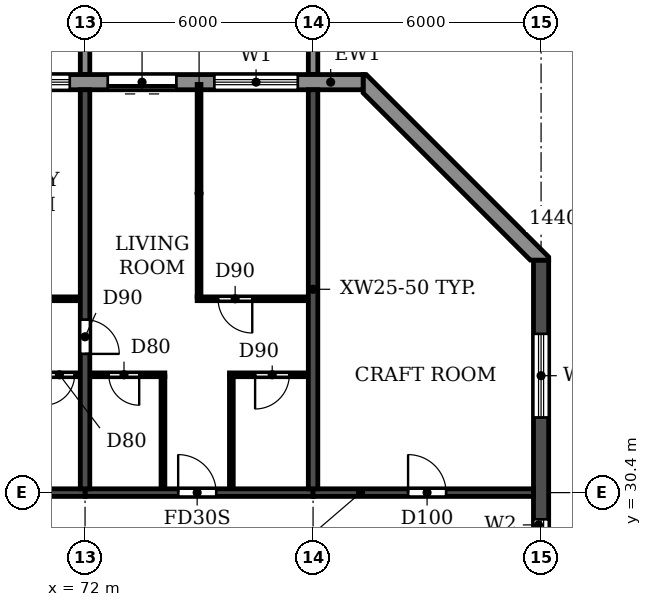
"""IFC4 building model, lengths in metres.
Left out: names, types, materials, properties, quantities, classifications, styles, units other than length and angle.
Written with IfcOpenShell. Run it as: python <this file> out.ifc"""

import sys

from ifc_helpers import new_model, si_unit, direction, frame, frame_2d, origin, place, context, subcontext, project, spatial, polyline, rectangle, outline, extrude, source, transform, mapped, element, fill, save


model = new_model("IFC4")
c1 = context("Model", 3, precision=1e-05, world=origin(), true_north=direction((0.0, 1.0)))
c2 = subcontext(c1, "Body", "Model", "MODEL_VIEW")
j1 = project(units=[si_unit("LENGTHUNIT", "METRE"), si_unit("PLANEANGLEUNIT", "RADIAN")], contexts=[c1])
p1 = place(None, origin())
s1 = spatial("IfcSite", under=j1, at=p1, CompositionType="ELEMENT")
p2 = place(p1, origin())
s2 = spatial("IfcBuilding", under=s1, at=p2, CompositionType="ELEMENT")
p3 = place(p2, frame((0.0, 0.0, 201.6)))
s3 = spatial("IfcBuildingStorey", under=s2, at=p3, CompositionType="ELEMENT", Elevation=201.6)
p4 = place(p3, frame((72.0, 30.5, 0.0), z_axis=(0.0, 0.0, 1.0), x_axis=(0.0, 1.0, 0.0)))
e1 = element("IfcWall", 1, at=p4, inside=s3, PredefinedType="SHEAR", context=c2, shape_type="SweptSolid", body=[
    extrude(rectangle(XDim=10.5, YDim=0.25, at=frame_2d((5.25, 0.0))), origin(), (0.0, 0.0, 1.0), 3.08),
])
p5 = place(p4, frame((3.55, 0.0, 0.0)))
e2 = element("IfcOpeningElement", 2, at=p5, cuts=e1, PredefinedType="OPENING", context=c2, shape_type="SweptSolid", body=[
    extrude(rectangle(XDim=0.9, YDim=2.1, at=frame_2d((0.45, 1.05))), frame((0.0, 0.135, 0.0), z_axis=(0.0, -1.0, 0.0), x_axis=(1.0, 0.0, 0.0)), (0.0, 0.0, 1.0), 0.27),
])
p6 = place(p3, frame((78.0, 30.5, 0.0), z_axis=(0.0, 0.0, 1.0), x_axis=(0.0, 1.0, 0.0)))
e3 = element("IfcWall", 3, at=p6, inside=s3, PredefinedType="SHEAR", context=c2, shape_type="SweptSolid", body=[
    extrude(rectangle(XDim=10.5, YDim=0.25, at=frame_2d((5.25, 0.0))), origin(), (0.0, 0.0, 1.0), 3.08),
])
p7 = place(p3, frame((84.0, 4.683, 0.0), z_axis=(0.0, 0.0, 1.0), x_axis=(0.0, 1.0, 0.0)))
e4 = element("IfcWall", 4, at=p7, inside=s3, PredefinedType="SHEAR", context=c2, shape_type="SweptSolid", body=[
    extrude(rectangle(XDim=31.834, YDim=0.4, at=frame_2d((15.917, 0.0))), origin(), (0.0, 0.0, 1.0), 3.08),
])
p8 = place(p7, frame((23.817, 0.0, 0.9)))
e5 = element("IfcOpeningElement", 5, at=p8, cuts=e4, PredefinedType="OPENING", context=c2, shape_type="SweptSolid", body=[
    extrude(rectangle(XDim=1.2, YDim=1.5, at=frame_2d((0.6, 0.75))), frame((0.0, 0.21, 0.0), z_axis=(0.0, -1.0, 0.0), x_axis=(1.0, 0.0, 0.0)), (0.0, 0.0, 1.0), 0.42),
])
p9 = place(p7, frame((8.017, 0.0, 0.9)))
e6 = element("IfcOpeningElement", 6, at=p9, cuts=e4, PredefinedType="OPENING", context=c2, shape_type="SweptSolid", body=[
    extrude(rectangle(XDim=1.2, YDim=1.5, at=frame_2d((0.6, 0.75))), frame((0.0, 0.21, 0.0), z_axis=(0.0, -1.0, 0.0), x_axis=(1.0, 0.0, 0.0)), (0.0, 0.0, 1.0), 0.42),
])
p10 = place(p7, frame((27.694, 0.0, 0.6)))
e7 = element("IfcOpeningElement", 7, at=p10, cuts=e4, PredefinedType="OPENING", context=c2, shape_type="SweptSolid", body=[
    extrude(rectangle(XDim=2.2, YDim=1.8, at=frame_2d((1.1, 0.9))), frame((0.0, 0.21, 0.0), z_axis=(0.0, -1.0, 0.0), x_axis=(1.0, 0.0, 0.0)), (0.0, 0.0, 1.0), 0.42),
])
p11 = place(p7, frame((2.541, 0.0, 0.6)))
e8 = element("IfcOpeningElement", 8, at=p11, cuts=e4, PredefinedType="OPENING", context=c2, shape_type="SweptSolid", body=[
    extrude(rectangle(XDim=2.2, YDim=1.8, at=frame_2d((1.1, 0.9))), frame((0.0, 0.21, 0.0), z_axis=(0.0, -1.0, 0.0), x_axis=(1.0, 0.0, 0.0)), (0.0, 0.0, 1.0), 0.42),
])
p12 = place(p7, frame((15.917, 0.0, 0.9)))
e9 = element("IfcOpeningElement", 9, at=p12, cuts=e4, PredefinedType="OPENING", context=c2, shape_type="SweptSolid", body=[
    extrude(rectangle(XDim=1.2, YDim=1.5, at=frame_2d((0.6, 0.75))), frame((0.0, 0.21, 0.0), z_axis=(0.0, -1.0, 0.0), x_axis=(1.0, 0.0, 0.0)), (0.0, 0.0, 1.0), 0.42),
])
p13 = place(p3, frame((66.0, 30.4, 0.0), z_axis=(0.0, 0.0, 1.0), x_axis=(1.0, 0.0, 0.0)))
e10 = element("IfcWall", 10, at=p13, inside=s3, PredefinedType="SHEAR", context=c2, shape_type="SweptSolid", body=[
    extrude(rectangle(XDim=6.0, YDim=0.2, at=frame_2d((3.0, 0.0))), origin(), (0.0, 0.0, 1.0), 2.48),
])
p14 = place(p3, frame((72.0, 30.4, 0.0), z_axis=(0.0, 0.0, 1.0), x_axis=(1.0, 0.0, 0.0)))
e11 = element("IfcWall", 11, at=p14, inside=s3, PredefinedType="SHEAR", context=c2, shape_type="SweptSolid", body=[
    extrude(rectangle(XDim=6.0, YDim=0.2, at=frame_2d((3.0, 0.0))), origin(), (0.0, 0.0, 1.0), 2.48),
])
p15 = place(p14, frame((2.45, 0.0, 0.0)))
e12 = element("IfcOpeningElement", 12, at=p15, cuts=e11, PredefinedType="OPENING", context=c2, shape_type="SweptSolid", body=[
    extrude(rectangle(XDim=1.0, YDim=2.1, at=frame_2d((0.5, 1.05))), frame((0.0, 0.11, 0.0), z_axis=(0.0, -1.0, 0.0), x_axis=(1.0, 0.0, 0.0)), (0.0, 0.0, 1.0), 0.22),
])
p16 = place(p3, frame((78.0, 30.4, 0.0), z_axis=(0.0, 0.0, 1.0), x_axis=(1.0, 0.0, 0.0)))
e13 = element("IfcWall", 13, at=p16, inside=s3, PredefinedType="SHEAR", context=c2, shape_type="SweptSolid", body=[
    extrude(rectangle(XDim=5.8, YDim=0.2, at=frame_2d((2.9, 0.0))), origin(), (0.0, 0.0, 1.0), 2.48),
])
p17 = place(p16, frame((2.5, 0.0, 0.0)))
e14 = element("IfcOpeningElement", 14, at=p17, cuts=e13, PredefinedType="OPENING", context=c2, shape_type="SweptSolid", body=[
    extrude(rectangle(XDim=1.0, YDim=2.1, at=frame_2d((0.5, 1.05))), frame((0.0, 0.11, 0.0), z_axis=(0.0, -1.0, 0.0), x_axis=(1.0, 0.0, 0.0)), (0.0, 0.0, 1.0), 0.22),
])
p18 = place(p3, origin())
e15 = element("IfcWall", 15, at=p18, inside=s3, PredefinedType="STANDARD", context=c2, shape_type="SweptSolid", body=[
    extrude(outline(polyline([(84.2, 36.517), (84.2, 36.6), (79.4, 41.4), (79.317, 41.4), (79.317, 40.917), (83.717, 36.517), (84.2, 36.517)])), origin(), (0.0, 0.0, 1.0), 3.08),
])
p19 = place(p3, frame((79.317, 41.2, 0.0), z_axis=(0.0, 0.0, 1.0), x_axis=(-1.0, 0.0, 0.0)))
e16 = element("IfcWall", 16, at=p19, inside=s3, PredefinedType="STANDARD", context=c2, shape_type="SweptSolid", body=[
    extrude(rectangle(XDim=56.634, YDim=0.4, at=frame_2d((28.317, 0.0))), origin(), (0.0, 0.0, 1.0), 3.08),
])
p20 = place(p19, frame((52.717, 0.0, 0.9)))
e17 = element("IfcOpeningElement", 17, at=p20, cuts=e16, PredefinedType="OPENING", context=c2, shape_type="SweptSolid", body=[
    extrude(rectangle(XDim=2.2, YDim=1.5, at=frame_2d((1.1, 0.75))), frame((0.0, 0.21, 0.0), z_axis=(0.0, -1.0, 0.0), x_axis=(1.0, 0.0, 0.0)), (0.0, 0.0, 1.0), 0.42),
])
p21 = place(p19, frame((49.917, 0.0, 0.0)))
e18 = element("IfcOpeningElement", 18, at=p21, cuts=e16, PredefinedType="OPENING", context=c2, shape_type="SweptSolid", body=[
    extrude(rectangle(XDim=1.8, YDim=2.4, at=frame_2d((0.9, 1.2))), frame((0.0, 0.21, 0.0), z_axis=(0.0, -1.0, 0.0), x_axis=(1.0, 0.0, 0.0)), (0.0, 0.0, 1.0), 0.42),
])
p22 = place(p19, frame((46.717, 0.0, 0.9)))
e19 = element("IfcOpeningElement", 19, at=p22, cuts=e16, PredefinedType="OPENING", context=c2, shape_type="SweptSolid", body=[
    extrude(rectangle(XDim=2.2, YDim=1.5, at=frame_2d((1.1, 0.75))), frame((0.0, 0.21, 0.0), z_axis=(0.0, -1.0, 0.0), x_axis=(1.0, 0.0, 0.0)), (0.0, 0.0, 1.0), 0.42),
])
p23 = place(p19, frame((43.917, 0.0, 0.0)))
e20 = element("IfcOpeningElement", 20, at=p23, cuts=e16, PredefinedType="OPENING", context=c2, shape_type="SweptSolid", body=[
    extrude(rectangle(XDim=1.8, YDim=2.4, at=frame_2d((0.9, 1.2))), frame((0.0, 0.21, 0.0), z_axis=(0.0, -1.0, 0.0), x_axis=(1.0, 0.0, 0.0)), (0.0, 0.0, 1.0), 0.42),
])
p24 = place(p19, frame((40.917, 0.0, 0.0)))
e21 = element("IfcOpeningElement", 21, at=p24, cuts=e16, PredefinedType="OPENING", context=c2, shape_type="SweptSolid", body=[
    extrude(rectangle(XDim=1.8, YDim=2.4, at=frame_2d((0.9, 1.2))), frame((0.0, 0.21, 0.0), z_axis=(0.0, -1.0, 0.0), x_axis=(1.0, 0.0, 0.0)), (0.0, 0.0, 1.0), 0.42),
])
p25 = place(p19, frame((37.717, 0.0, 0.9)))
e22 = element("IfcOpeningElement", 22, at=p25, cuts=e16, PredefinedType="OPENING", context=c2, shape_type="SweptSolid", body=[
    extrude(rectangle(XDim=2.2, YDim=1.5, at=frame_2d((1.1, 0.75))), frame((0.0, 0.21, 0.0), z_axis=(0.0, -1.0, 0.0), x_axis=(1.0, 0.0, 0.0)), (0.0, 0.0, 1.0), 0.42),
])
p26 = place(p19, frame((34.717, 0.0, 0.9)))
e23 = element("IfcOpeningElement", 23, at=p26, cuts=e16, PredefinedType="OPENING", context=c2, shape_type="SweptSolid", body=[
    extrude(rectangle(XDim=2.2, YDim=1.5, at=frame_2d((1.1, 0.75))), frame((0.0, 0.21, 0.0), z_axis=(0.0, -1.0, 0.0), x_axis=(1.0, 0.0, 0.0)), (0.0, 0.0, 1.0), 0.42),
])
p27 = place(p19, frame((31.717, 0.0, 0.9)))
e24 = element("IfcOpeningElement", 24, at=p27, cuts=e16, PredefinedType="OPENING", context=c2, shape_type="SweptSolid", body=[
    extrude(rectangle(XDim=2.2, YDim=1.5, at=frame_2d((1.1, 0.75))), frame((0.0, 0.21, 0.0), z_axis=(0.0, -1.0, 0.0), x_axis=(1.0, 0.0, 0.0)), (0.0, 0.0, 1.0), 0.42),
])
p28 = place(p19, frame((28.717, 0.0, 0.9)))
e25 = element("IfcOpeningElement", 25, at=p28, cuts=e16, PredefinedType="OPENING", context=c2, shape_type="SweptSolid", body=[
    extrude(rectangle(XDim=2.2, YDim=1.5, at=frame_2d((1.1, 0.75))), frame((0.0, 0.21, 0.0), z_axis=(0.0, -1.0, 0.0), x_axis=(1.0, 0.0, 0.0)), (0.0, 0.0, 1.0), 0.42),
])
p29 = place(p19, frame((25.917, 0.0, 0.0)))
e26 = element("IfcOpeningElement", 26, at=p29, cuts=e16, PredefinedType="OPENING", context=c2, shape_type="SweptSolid", body=[
    extrude(rectangle(XDim=1.8, YDim=2.4, at=frame_2d((0.9, 1.2))), frame((0.0, 0.21, 0.0), z_axis=(0.0, -1.0, 0.0), x_axis=(1.0, 0.0, 0.0)), (0.0, 0.0, 1.0), 0.42),
])
p30 = place(p19, frame((22.717, 0.0, 0.9)))
e27 = element("IfcOpeningElement", 27, at=p30, cuts=e16, PredefinedType="OPENING", context=c2, shape_type="SweptSolid", body=[
    extrude(rectangle(XDim=2.2, YDim=1.5, at=frame_2d((1.1, 0.75))), frame((0.0, 0.21, 0.0), z_axis=(0.0, -1.0, 0.0), x_axis=(1.0, 0.0, 0.0)), (0.0, 0.0, 1.0), 0.42),
])
p31 = place(p19, frame((19.717, 0.0, 0.9)))
e28 = element("IfcOpeningElement", 28, at=p31, cuts=e16, PredefinedType="OPENING", context=c2, shape_type="SweptSolid", body=[
    extrude(rectangle(XDim=2.2, YDim=1.5, at=frame_2d((1.1, 0.75))), frame((0.0, 0.21, 0.0), z_axis=(0.0, -1.0, 0.0), x_axis=(1.0, 0.0, 0.0)), (0.0, 0.0, 1.0), 0.42),
])
p32 = place(p19, frame((16.917, 0.0, 0.0)))
e29 = element("IfcOpeningElement", 29, at=p32, cuts=e16, PredefinedType="OPENING", context=c2, shape_type="SweptSolid", body=[
    extrude(rectangle(XDim=1.8, YDim=2.4, at=frame_2d((0.9, 1.2))), frame((0.0, 0.21, 0.0), z_axis=(0.0, -1.0, 0.0), x_axis=(1.0, 0.0, 0.0)), (0.0, 0.0, 1.0), 0.42),
])
p33 = place(p19, frame((13.717, 0.0, 0.9)))
e30 = element("IfcOpeningElement", 30, at=p33, cuts=e16, PredefinedType="OPENING", context=c2, shape_type="SweptSolid", body=[
    extrude(rectangle(XDim=2.2, YDim=1.5, at=frame_2d((1.1, 0.75))), frame((0.0, 0.21, 0.0), z_axis=(0.0, -1.0, 0.0), x_axis=(1.0, 0.0, 0.0)), (0.0, 0.0, 1.0), 0.42),
])
p34 = place(p19, frame((10.717, 0.0, 0.9)))
e31 = element("IfcOpeningElement", 31, at=p34, cuts=e16, PredefinedType="OPENING", context=c2, shape_type="SweptSolid", body=[
    extrude(rectangle(XDim=2.2, YDim=1.5, at=frame_2d((1.1, 0.75))), frame((0.0, 0.21, 0.0), z_axis=(0.0, -1.0, 0.0), x_axis=(1.0, 0.0, 0.0)), (0.0, 0.0, 1.0), 0.42),
])
p35 = place(p19, frame((7.717, 0.0, 0.9)))
e32 = element("IfcOpeningElement", 32, at=p35, cuts=e16, PredefinedType="OPENING", context=c2, shape_type="SweptSolid", body=[
    extrude(rectangle(XDim=2.2, YDim=1.5, at=frame_2d((1.1, 0.75))), frame((0.0, 0.21, 0.0), z_axis=(0.0, -1.0, 0.0), x_axis=(1.0, 0.0, 0.0)), (0.0, 0.0, 1.0), 0.42),
])
p36 = place(p19, frame((4.917, 0.0, 0.0)))
e33 = element("IfcOpeningElement", 33, at=p36, cuts=e16, PredefinedType="OPENING", context=c2, shape_type="SweptSolid", body=[
    extrude(rectangle(XDim=1.8, YDim=2.4, at=frame_2d((0.9, 1.2))), frame((0.0, 0.21, 0.0), z_axis=(0.0, -1.0, 0.0), x_axis=(1.0, 0.0, 0.0)), (0.0, 0.0, 1.0), 0.42),
])
p37 = place(p19, frame((1.717, 0.0, 0.9)))
e34 = element("IfcOpeningElement", 34, at=p37, cuts=e16, PredefinedType="OPENING", context=c2, shape_type="SweptSolid", body=[
    extrude(rectangle(XDim=2.2, YDim=1.5, at=frame_2d((1.1, 0.75))), frame((0.0, 0.21, 0.0), z_axis=(0.0, -1.0, 0.0), x_axis=(1.0, 0.0, 0.0)), (0.0, 0.0, 1.0), 0.42),
])
m1 = source(origin(), c2, "Body", "SweptSolid", [
    extrude(outline(polyline([(0.0, 0.0), (0.25, 0.0), (0.25, 3.1), (0.0, 3.1), (0.0, 0.0)])), origin(), (0.0, 0.0, 1.0), 3.1),
])
for number, where in (
    (35, (71.875, 41.4, 0.0)),
    (36, (77.875, 41.4, 0.0)),
):
    element("IfcWall", number, at=place(p3, frame(where)), inside=s3, PredefinedType="STANDARD", context=c2, shape_type="MappedRepresentation", body=[
        mapped(m1, transform((0.0, 0.0, 0.0))),
    ])
p38 = place(p3, frame((69.1, 33.5, 0.0), z_axis=(0.0, 0.0, 1.0), x_axis=(1.0, 0.0, 0.0)))
e37 = element("IfcWall", 37, at=p38, inside=s3, PredefinedType="PARTITIONING", context=c2, shape_type="SweptSolid", body=[
    extrude(rectangle(XDim=2.765, YDim=0.1, at=frame_2d((1.382, 0.0))), origin(), (0.0, 0.0, 1.0), 3.08),
])
p39 = place(p38, frame((0.325, 0.0, 0.0)))
e38 = element("IfcOpeningElement", 38, at=p39, cuts=e37, PredefinedType="OPENING", context=c2, shape_type="SweptSolid", body=[
    extrude(rectangle(XDim=0.8, YDim=2.1, at=frame_2d((0.4, 1.05))), frame((0.0, 0.06, 0.0), z_axis=(0.0, -1.0, 0.0), x_axis=(1.0, 0.0, 0.0)), (0.0, 0.0, 1.0), 0.12),
])
p40 = place(p38, frame((1.825, 0.0, 0.0)))
e39 = element("IfcOpeningElement", 39, at=p40, cuts=e37, PredefinedType="OPENING", context=c2, shape_type="SweptSolid", body=[
    extrude(rectangle(XDim=0.8, YDim=2.1, at=frame_2d((0.4, 1.05))), frame((0.0, 0.06, 0.0), z_axis=(0.0, -1.0, 0.0), x_axis=(1.0, 0.0, 0.0)), (0.0, 0.0, 1.0), 0.12),
])
p41 = place(p3, frame((72.135, 33.5, 0.0), z_axis=(0.0, 0.0, 1.0), x_axis=(1.0, 0.0, 0.0)))
e40 = element("IfcWall", 40, at=p41, inside=s3, PredefinedType="PARTITIONING", context=c2, shape_type="SweptSolid", body=[
    extrude(rectangle(XDim=1.965, YDim=0.1, at=frame_2d((0.982, 0.0))), origin(), (0.0, 0.0, 1.0), 3.08),
])
p42 = place(p41, frame((0.49, 0.0, 0.0)))
e41 = element("IfcOpeningElement", 41, at=p42, cuts=e40, PredefinedType="OPENING", context=c2, shape_type="SweptSolid", body=[
    extrude(rectangle(XDim=0.8, YDim=2.1, at=frame_2d((0.4, 1.05))), frame((0.0, 0.06, 0.0), z_axis=(0.0, -1.0, 0.0), x_axis=(1.0, 0.0, 0.0)), (0.0, 0.0, 1.0), 0.12),
])
p43 = place(p3, frame((75.8, 33.5, 0.0), z_axis=(0.0, 0.0, 1.0), x_axis=(1.0, 0.0, 0.0)))
e42 = element("IfcWall", 42, at=p43, inside=s3, PredefinedType="PARTITIONING", context=c2, shape_type="SweptSolid", body=[
    extrude(rectangle(XDim=2.065, YDim=0.1, at=frame_2d((1.032, 0.0))), origin(), (0.0, 0.0, 1.0), 3.08),
])
p44 = place(p43, frame((0.675, 0.0, 0.0)))
e43 = element("IfcOpeningElement", 43, at=p44, cuts=e42, PredefinedType="OPENING", context=c2, shape_type="SweptSolid", body=[
    extrude(rectangle(XDim=0.9, YDim=2.1, at=frame_2d((0.45, 1.05))), frame((0.0, 0.06, 0.0), z_axis=(0.0, -1.0, 0.0), x_axis=(1.0, 0.0, 0.0)), (0.0, 0.0, 1.0), 0.12),
])
p45 = place(p3, frame((69.1, 35.5, 0.0), z_axis=(0.0, 0.0, 1.0), x_axis=(1.0, 0.0, 0.0)))
e44 = element("IfcWall", 44, at=p45, inside=s3, PredefinedType="PARTITIONING", context=c2, shape_type="SweptSolid", body=[
    extrude(rectangle(XDim=2.765, YDim=0.1, at=frame_2d((1.382, 0.0))), origin(), (0.0, 0.0, 1.0), 3.08),
])
p46 = place(p45, frame((0.4, 0.0, 0.0)))
e45 = element("IfcOpeningElement", 45, at=p46, cuts=e44, PredefinedType="OPENING", context=c2, shape_type="SweptSolid", body=[
    extrude(rectangle(XDim=0.9, YDim=2.1, at=frame_2d((0.45, 1.05))), frame((0.0, 0.06, 0.0), z_axis=(0.0, -1.0, 0.0), x_axis=(1.0, 0.0, 0.0)), (0.0, 0.0, 1.0), 0.12),
])
p47 = place(p3, frame((74.95, 35.5, 0.0), z_axis=(0.0, 0.0, 1.0), x_axis=(1.0, 0.0, 0.0)))
e46 = element("IfcWall", 46, at=p47, inside=s3, PredefinedType="PARTITIONING", context=c2, shape_type="SweptSolid", body=[
    extrude(rectangle(XDim=2.915, YDim=0.1, at=frame_2d((1.458, 0.0))), origin(), (0.0, 0.0, 1.0), 3.08),
])
p48 = place(p47, frame((0.55, 0.0, 0.0)))
e47 = element("IfcOpeningElement", 47, at=p48, cuts=e46, PredefinedType="OPENING", context=c2, shape_type="SweptSolid", body=[
    extrude(rectangle(XDim=0.9, YDim=2.1, at=frame_2d((0.45, 1.05))), frame((0.0, 0.06, 0.0), z_axis=(0.0, -1.0, 0.0), x_axis=(1.0, 0.0, 0.0)), (0.0, 0.0, 1.0), 0.12),
])
p49 = place(p3, frame((74.05, 30.51, 0.0), z_axis=(0.0, 0.0, 1.0), x_axis=(0.0, 1.0, 0.0)))
e48 = element("IfcWall", 48, at=p49, inside=s3, PredefinedType="PARTITIONING", context=c2, shape_type="SweptSolid", body=[
    extrude(rectangle(XDim=2.94, YDim=0.1, at=frame_2d((1.47, 0.0))), origin(), (0.0, 0.0, 1.0), 3.08),
])
p50 = place(p3, frame((75.0, 35.55, 0.0), z_axis=(0.0, 0.0, 1.0), x_axis=(0.0, 1.0, 0.0)))
e49 = element("IfcWall", 49, at=p50, inside=s3, PredefinedType="PARTITIONING", context=c2, shape_type="SweptSolid", body=[
    extrude(rectangle(XDim=5.59, YDim=0.1, at=frame_2d((2.795, 0.0))), origin(), (0.0, 0.0, 1.0), 3.08),
])
p51 = place(p3, frame((75.85, 30.51, 0.0), z_axis=(0.0, 0.0, 1.0), x_axis=(0.0, 1.0, 0.0)))
e50 = element("IfcWall", 50, at=p51, inside=s3, PredefinedType="PARTITIONING", context=c2, shape_type="SweptSolid", body=[
    extrude(rectangle(XDim=2.94, YDim=0.1, at=frame_2d((1.47, 0.0))), origin(), (0.0, 0.0, 1.0), 3.08),
])
p52 = place(p8, origin())
e51 = element("IfcWindow", 51, at=p52, inside=s3, PartitioningType="SINGLE_PANEL", PredefinedType="WINDOW", context=c2, shape_type="SweptSolid", body=[
    extrude(rectangle(XDim=1.2, YDim=1.5, at=frame_2d((0.6, 0.75))), frame((0.0, 0.03, 0.0), z_axis=(0.0, -1.0, 0.0), x_axis=(1.0, 0.0, 0.0)), (0.0, 0.0, 1.0), 0.06),
])
fill(e5, e51)
p53 = place(p10, origin())
e52 = element("IfcWindow", 52, at=p53, inside=s3, PartitioningType="DOUBLE_PANEL_HORIZONTAL", PredefinedType="WINDOW", context=c2, shape_type="SweptSolid", body=[
    extrude(rectangle(XDim=2.2, YDim=1.8, at=frame_2d((1.1, 0.9))), frame((0.0, 0.03, 0.0), z_axis=(0.0, -1.0, 0.0), x_axis=(1.0, 0.0, 0.0)), (0.0, 0.0, 1.0), 0.06),
])
fill(e7, e52)
p54 = place(p35, origin())
e53 = element("IfcWindow", 53, at=p54, inside=s3, PartitioningType="DOUBLE_PANEL_HORIZONTAL", PredefinedType="WINDOW", context=c2, shape_type="SweptSolid", body=[
    extrude(rectangle(XDim=2.2, YDim=1.5, at=frame_2d((1.1, 0.75))), frame((0.0, 0.03, 0.0), z_axis=(0.0, -1.0, 0.0), x_axis=(1.0, 0.0, 0.0)), (0.0, 0.0, 1.0), 0.06),
])
fill(e32, e53)
p55 = place(p36, origin())
e54 = element("IfcDoor", 54, at=p55, inside=s3, OperationType="DOUBLE_DOOR_SLIDING", PredefinedType="DOOR", context=c2, shape_type="SweptSolid", body=[
    extrude(rectangle(XDim=1.8, YDim=2.4, at=frame_2d((0.9, 1.2))), frame((0.0, 0.025, 0.0), z_axis=(0.0, -1.0, 0.0), x_axis=(1.0, 0.0, 0.0)), (0.0, 0.0, 1.0), 0.05),
])
fill(e33, e54)
p56 = place(p37, origin())
e55 = element("IfcWindow", 55, at=p56, inside=s3, PartitioningType="DOUBLE_PANEL_HORIZONTAL", PredefinedType="WINDOW", context=c2, shape_type="SweptSolid", body=[
    extrude(rectangle(XDim=2.2, YDim=1.5, at=frame_2d((1.1, 0.75))), frame((0.0, 0.03, 0.0), z_axis=(0.0, -1.0, 0.0), x_axis=(1.0, 0.0, 0.0)), (0.0, 0.0, 1.0), 0.06),
])
fill(e34, e55)
p57 = place(p40, frame((0.8, 0.0, 0.0), z_axis=(0.0, 0.0, 1.0), x_axis=(-1.0, 0.0, 0.0)))
e56 = element("IfcDoor", 56, at=p57, inside=s3, OperationType="SINGLE_SWING_RIGHT", PredefinedType="DOOR", context=c2, shape_type="SweptSolid", body=[
    extrude(rectangle(XDim=0.8, YDim=2.1, at=frame_2d((0.4, 1.05))), frame((0.0, 0.025, 0.0), z_axis=(0.0, -1.0, 0.0), x_axis=(1.0, 0.0, 0.0)), (0.0, 0.0, 1.0), 0.05),
])
fill(e39, e56)
p58 = place(p5, frame((0.9, 0.0, 0.0), z_axis=(0.0, 0.0, 1.0), x_axis=(-1.0, 0.0, 0.0)))
e57 = element("IfcDoor", 57, at=p58, inside=s3, OperationType="SINGLE_SWING_RIGHT", PredefinedType="DOOR", context=c2, shape_type="SweptSolid", body=[
    extrude(rectangle(XDim=0.9, YDim=2.1, at=frame_2d((0.45, 1.05))), frame((0.0, 0.025, 0.0), z_axis=(0.0, -1.0, 0.0), x_axis=(1.0, 0.0, 0.0)), (0.0, 0.0, 1.0), 0.05),
])
fill(e2, e57)
p59 = place(p42, frame((0.8, 0.0, 0.0), z_axis=(0.0, 0.0, 1.0), x_axis=(-1.0, 0.0, 0.0)))
e58 = element("IfcDoor", 58, at=p59, inside=s3, OperationType="SINGLE_SWING_LEFT", PredefinedType="DOOR", context=c2, shape_type="SweptSolid", body=[
    extrude(rectangle(XDim=0.8, YDim=2.1, at=frame_2d((0.4, 1.05))), frame((0.0, 0.025, 0.0), z_axis=(0.0, -1.0, 0.0), x_axis=(1.0, 0.0, 0.0)), (0.0, 0.0, 1.0), 0.05),
])
fill(e41, e58)
p60 = place(p15, origin())
e59 = element("IfcDoor", 59, at=p60, inside=s3, OperationType="SINGLE_SWING_LEFT", PredefinedType="DOOR", context=c2, shape_type="SweptSolid", body=[
    extrude(rectangle(XDim=1.0, YDim=2.1, at=frame_2d((0.5, 1.05))), frame((0.0, 0.025, 0.0), z_axis=(0.0, -1.0, 0.0), x_axis=(1.0, 0.0, 0.0)), (0.0, 0.0, 1.0), 0.05),
])
fill(e12, e59)
p61 = place(p48, frame((0.9, 0.0, 0.0), z_axis=(0.0, 0.0, 1.0), x_axis=(-1.0, 0.0, 0.0)))
e60 = element("IfcDoor", 60, at=p61, inside=s3, OperationType="SINGLE_SWING_LEFT", PredefinedType="DOOR", context=c2, shape_type="SweptSolid", body=[
    extrude(rectangle(XDim=0.9, YDim=2.1, at=frame_2d((0.45, 1.05))), frame((0.0, 0.025, 0.0), z_axis=(0.0, -1.0, 0.0), x_axis=(1.0, 0.0, 0.0)), (0.0, 0.0, 1.0), 0.05),
])
fill(e47, e60)
p62 = place(p44, frame((0.9, 0.0, 0.0), z_axis=(0.0, 0.0, 1.0), x_axis=(-1.0, 0.0, 0.0)))
e61 = element("IfcDoor", 61, at=p62, inside=s3, OperationType="SINGLE_SWING_RIGHT", PredefinedType="DOOR", context=c2, shape_type="SweptSolid", body=[
    extrude(rectangle(XDim=0.9, YDim=2.1, at=frame_2d((0.45, 1.05))), frame((0.0, 0.025, 0.0), z_axis=(0.0, -1.0, 0.0), x_axis=(1.0, 0.0, 0.0)), (0.0, 0.0, 1.0), 0.05),
])
fill(e43, e61)
p63 = place(p17, origin())
e62 = element("IfcDoor", 62, at=p63, inside=s3, OperationType="SINGLE_SWING_LEFT", PredefinedType="DOOR", context=c2, shape_type="SweptSolid", body=[
    extrude(rectangle(XDim=1.0, YDim=2.1, at=frame_2d((0.5, 1.05))), frame((0.0, 0.025, 0.0), z_axis=(0.0, -1.0, 0.0), x_axis=(1.0, 0.0, 0.0)), (0.0, 0.0, 1.0), 0.05),
])
fill(e14, e62)
save(model, sys.argv[1])
